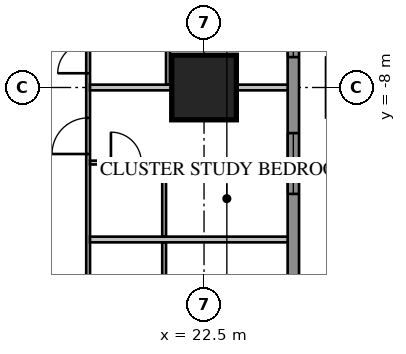
"""IFC4 building model, lengths in metres.
Left out: names, types, materials, properties, quantities, classifications, styles, units other than length and angle.
Written with IfcOpenShell. Run it as: python <this file> out.ifc"""

import sys

from ifc_helpers import new_model, si_unit, direction, frame, frame_2d, origin, origin_2d, place, context, subcontext, project, spatial, rectangle, extrude, element, fill, save


model = new_model("IFC4")
c1 = context("Model", 3, precision=1e-05, world=origin(), true_north=direction((0.0, 1.0)))
c2 = subcontext(c1, "Body", "Model", "MODEL_VIEW")
j1 = project(units=[si_unit("LENGTHUNIT", "METRE"), si_unit("PLANEANGLEUNIT", "RADIAN")], contexts=[c1])
p1 = place(None, origin())
s1 = spatial("IfcSite", under=j1, at=p1, CompositionType="ELEMENT")
p2 = place(p1, origin())
s2 = spatial("IfcBuilding", under=s1, at=p2, CompositionType="ELEMENT")
p3 = place(p2, frame((0.0, 0.0, 35.25)))
s3 = spatial("IfcBuildingStorey", under=s2, at=p3, CompositionType="ELEMENT", Elevation=35.25)
p4 = place(p3, frame((22.5, -8.0, 0.0), z_axis=(0.0, 0.0, 1.0), x_axis=(1.0, 0.0, 0.0)))
e1 = element("IfcColumn", 1, at=p4, inside=s3, PredefinedType="COLUMN", context=c2, shape_type="SweptSolid", body=[
    extrude(rectangle(XDim=1.7, YDim=1.7, at=origin_2d()), origin(), (0.0, 0.0, 1.0), 3.85),
])
p5 = place(p3, frame((24.85, -16.0, 0.0), z_axis=(0.0, 0.0, 1.0), x_axis=(0.0, 1.0, 0.0)))
e2 = element("IfcWall", 2, at=p5, inside=s3, PredefinedType="SOLIDWALL", context=c2, shape_type="SweptSolid", body=[
    extrude(rectangle(XDim=32.0, YDim=0.3, at=frame_2d((16.0, 0.0))), origin(), (0.0, 0.0, 1.0), 3.65),
])
p6 = place(p5, frame((1.2, 0.0, 0.75)))
e3 = element("IfcOpeningElement", 3, at=p6, cuts=e2, PredefinedType="OPENING", context=c2, shape_type="SweptSolid", body=[
    extrude(rectangle(XDim=1.6, YDim=1.8, at=frame_2d((0.8, 0.9))), frame((0.0, 0.17, 0.0), z_axis=(0.0, -1.0, 0.0), x_axis=(1.0, 0.0, 0.0)), (0.0, 0.0, 1.0), 0.34),
])
p7 = place(p5, frame((5.2, 0.0, 0.75)))
e4 = element("IfcOpeningElement", 4, at=p7, cuts=e2, PredefinedType="OPENING", context=c2, shape_type="SweptSolid", body=[
    extrude(rectangle(XDim=1.6, YDim=1.8, at=frame_2d((0.8, 0.9))), frame((0.0, 0.17, 0.0), z_axis=(0.0, -1.0, 0.0), x_axis=(1.0, 0.0, 0.0)), (0.0, 0.0, 1.0), 0.34),
])
p8 = place(p5, frame((17.2, 0.0, 0.75)))
e5 = element("IfcOpeningElement", 5, at=p8, cuts=e2, PredefinedType="OPENING", context=c2, shape_type="SweptSolid", body=[
    extrude(rectangle(XDim=1.6, YDim=1.8, at=frame_2d((0.8, 0.9))), frame((0.0, 0.17, 0.0), z_axis=(0.0, -1.0, 0.0), x_axis=(1.0, 0.0, 0.0)), (0.0, 0.0, 1.0), 0.34),
])
p9 = place(p5, frame((21.2, 0.0, 0.75)))
e6 = element("IfcOpeningElement", 6, at=p9, cuts=e2, PredefinedType="OPENING", context=c2, shape_type="SweptSolid", body=[
    extrude(rectangle(XDim=1.6, YDim=1.8, at=frame_2d((0.8, 0.9))), frame((0.0, 0.17, 0.0), z_axis=(0.0, -1.0, 0.0), x_axis=(1.0, 0.0, 0.0)), (0.0, 0.0, 1.0), 0.34),
])
p10 = place(p5, frame((25.2, 0.0, 0.75)))
e7 = element("IfcOpeningElement", 7, at=p10, cuts=e2, PredefinedType="OPENING", context=c2, shape_type="SweptSolid", body=[
    extrude(rectangle(XDim=1.6, YDim=1.8, at=frame_2d((0.8, 0.9))), frame((0.0, 0.17, 0.0), z_axis=(0.0, -1.0, 0.0), x_axis=(1.0, 0.0, 0.0)), (0.0, 0.0, 1.0), 0.34),
])
p11 = place(p5, frame((29.2, 0.0, 0.75)))
e8 = element("IfcOpeningElement", 8, at=p11, cuts=e2, PredefinedType="OPENING", context=c2, shape_type="SweptSolid", body=[
    extrude(rectangle(XDim=1.6, YDim=1.8, at=frame_2d((0.8, 0.9))), frame((0.0, 0.17, 0.0), z_axis=(0.0, -1.0, 0.0), x_axis=(1.0, 0.0, 0.0)), (0.0, 0.0, 1.0), 0.34),
])
p12 = place(p5, frame((8.8, 0.0, 0.75)))
e9 = element("IfcOpeningElement", 9, at=p12, cuts=e2, PredefinedType="OPENING", context=c2, shape_type="SweptSolid", body=[
    extrude(rectangle(XDim=2.4, YDim=1.8, at=frame_2d((1.2, 0.9))), frame((0.0, 0.17, 0.0), z_axis=(0.0, -1.0, 0.0), x_axis=(1.0, 0.0, 0.0)), (0.0, 0.0, 1.0), 0.34),
])
p13 = place(p5, frame((13.812, 0.0, 0.0)))
e10 = element("IfcOpeningElement", 10, at=p13, cuts=e2, PredefinedType="OPENING", context=c2, shape_type="SweptSolid", body=[
    extrude(rectangle(XDim=1.0, YDim=2.4, at=frame_2d((0.5, 1.2))), frame((0.0, 0.17, 0.0), z_axis=(0.0, -1.0, 0.0), x_axis=(1.0, 0.0, 0.0)), (0.0, 0.0, 1.0), 0.34),
])
p14 = place(p3, frame((19.45, -15.925, 0.0), z_axis=(0.0, 0.0, 1.0), x_axis=(0.0, 1.0, 0.0)))
e11 = element("IfcWall", 11, at=p14, inside=s3, PredefinedType="PARTITIONING", context=c2, shape_type="SweptSolid", body=[
    extrude(rectangle(XDim=31.85, YDim=0.1, at=frame_2d((15.925, 0.0))), origin(), (0.0, 0.0, 1.0), 3.65),
])
p15 = place(p14, frame((10.125, 0.0, 0.0)))
e12 = element("IfcOpeningElement", 12, at=p15, cuts=e11, PredefinedType="OPENING", context=c2, shape_type="SweptSolid", body=[
    extrude(rectangle(XDim=1.0, YDim=2.1, at=frame_2d((0.5, 1.05))), frame((0.0, 0.07, 0.0), z_axis=(0.0, -1.0, 0.0), x_axis=(1.0, 0.0, 0.0)), (0.0, 0.0, 1.0), 0.14),
])
p16 = place(p14, frame((8.3, 0.0, 0.0)))
e13 = element("IfcOpeningElement", 13, at=p16, cuts=e11, PredefinedType="OPENING", context=c2, shape_type="SweptSolid", body=[
    extrude(rectangle(XDim=0.8, YDim=2.1, at=frame_2d((0.4, 1.05))), frame((0.0, 0.07, 0.0), z_axis=(0.0, -1.0, 0.0), x_axis=(1.0, 0.0, 0.0)), (0.0, 0.0, 1.0), 0.14),
])
p17 = place(p14, frame((0.3, 0.0, 0.0)))
e14 = element("IfcOpeningElement", 14, at=p17, cuts=e11, PredefinedType="OPENING", context=c2, shape_type="SweptSolid", body=[
    extrude(rectangle(XDim=0.95, YDim=2.1, at=frame_2d((0.475, 1.05))), frame((0.0, 0.07, 0.0), z_axis=(0.0, -1.0, 0.0), x_axis=(1.0, 0.0, 0.0)), (0.0, 0.0, 1.0), 0.14),
])
p18 = place(p14, frame((6.175, 0.0, 0.0)))
e15 = element("IfcOpeningElement", 15, at=p18, cuts=e11, PredefinedType="OPENING", context=c2, shape_type="SweptSolid", body=[
    extrude(rectangle(XDim=0.95, YDim=2.1, at=frame_2d((0.475, 1.05))), frame((0.0, 0.07, 0.0), z_axis=(0.0, -1.0, 0.0), x_axis=(1.0, 0.0, 0.0)), (0.0, 0.0, 1.0), 0.14),
])
p19 = place(p14, frame((16.3, 0.0, 0.0)))
e16 = element("IfcOpeningElement", 16, at=p19, cuts=e11, PredefinedType="OPENING", context=c2, shape_type="SweptSolid", body=[
    extrude(rectangle(XDim=0.95, YDim=2.1, at=frame_2d((0.475, 1.05))), frame((0.0, 0.07, 0.0), z_axis=(0.0, -1.0, 0.0), x_axis=(1.0, 0.0, 0.0)), (0.0, 0.0, 1.0), 0.14),
])
p20 = place(p14, frame((22.175, 0.0, 0.0)))
e17 = element("IfcOpeningElement", 17, at=p20, cuts=e11, PredefinedType="OPENING", context=c2, shape_type="SweptSolid", body=[
    extrude(rectangle(XDim=0.95, YDim=2.1, at=frame_2d((0.475, 1.05))), frame((0.0, 0.07, 0.0), z_axis=(0.0, -1.0, 0.0), x_axis=(1.0, 0.0, 0.0)), (0.0, 0.0, 1.0), 0.14),
])
p21 = place(p14, frame((24.3, 0.0, 0.0)))
e18 = element("IfcOpeningElement", 18, at=p21, cuts=e11, PredefinedType="OPENING", context=c2, shape_type="SweptSolid", body=[
    extrude(rectangle(XDim=0.95, YDim=2.1, at=frame_2d((0.475, 1.05))), frame((0.0, 0.07, 0.0), z_axis=(0.0, -1.0, 0.0), x_axis=(1.0, 0.0, 0.0)), (0.0, 0.0, 1.0), 0.14),
])
p22 = place(p14, frame((30.175, 0.0, 0.0)))
e19 = element("IfcOpeningElement", 19, at=p22, cuts=e11, PredefinedType="OPENING", context=c2, shape_type="SweptSolid", body=[
    extrude(rectangle(XDim=0.95, YDim=2.1, at=frame_2d((0.475, 1.05))), frame((0.0, 0.07, 0.0), z_axis=(0.0, -1.0, 0.0), x_axis=(1.0, 0.0, 0.0)), (0.0, 0.0, 1.0), 0.14),
])
p23 = place(p3, frame((21.55, -7.925, 0.0), z_axis=(0.0, 0.0, 1.0), x_axis=(0.0, 1.0, 0.0)))
e20 = element("IfcWall", 20, at=p23, inside=s3, PredefinedType="PARTITIONING", context=c2, shape_type="SweptSolid", body=[
    extrude(rectangle(XDim=1.7, YDim=0.1, at=frame_2d((0.85, 0.0))), origin(), (0.0, 0.0, 1.0), 3.65),
])
for number, where, z_axis, x_axis in (
    (21, (19.5, -12.0, 0.0), (0.0, 0.0, 1.0), (1.0, 0.0, 0.0)),
    (22, (19.5, -8.0, 0.0), (0.0, 0.0, 1.0), (1.0, 0.0, 0.0)),
):
    element("IfcWall", number, at=place(p3, frame(where, z_axis=z_axis, x_axis=x_axis)), inside=s3, PredefinedType="PARTITIONING", context=c2, shape_type="SweptSolid", body=[
        extrude(rectangle(XDim=5.2, YDim=0.15, at=frame_2d((2.6, 0.0))), origin(), (0.0, 0.0, 1.0), 3.65),
    ])
p24 = place(p3, frame((21.45, -13.975, 0.0), z_axis=(0.0, 0.0, 1.0), x_axis=(0.0, 1.0, 0.0)))
e23 = element("IfcWall", 23, at=p24, inside=s3, PredefinedType="PARTITIONING", context=c2, shape_type="SweptSolid", body=[
    extrude(rectangle(XDim=1.9, YDim=0.1, at=frame_2d((0.95, 0.0))), origin(), (0.0, 0.0, 1.0), 3.65),
])
p25 = place(p3, frame((19.5, -9.975, 0.0), z_axis=(0.0, 0.0, 1.0), x_axis=(1.0, 0.0, 0.0)))
e24 = element("IfcWall", 24, at=p25, inside=s3, PredefinedType="PARTITIONING", context=c2, shape_type="SweptSolid", body=[
    extrude(rectangle(XDim=2.0, YDim=0.1, at=frame_2d((1.0, 0.0))), origin(), (0.0, 0.0, 1.0), 3.65),
])
p26 = place(p25, frame((0.55, 0.0, 0.0)))
e25 = element("IfcOpeningElement", 25, at=p26, cuts=e24, PredefinedType="OPENING", context=c2, shape_type="SweptSolid", body=[
    extrude(rectangle(XDim=0.8, YDim=2.1, at=frame_2d((0.4, 1.05))), frame((0.0, 0.07, 0.0), z_axis=(0.0, -1.0, 0.0), x_axis=(1.0, 0.0, 0.0)), (0.0, 0.0, 1.0), 0.14),
])
p27 = place(p3, frame((21.45, -11.925, 0.0), z_axis=(0.0, 0.0, 1.0), x_axis=(0.0, 1.0, 0.0)))
e26 = element("IfcWall", 26, at=p27, inside=s3, PredefinedType="PARTITIONING", context=c2, shape_type="SweptSolid", body=[
    extrude(rectangle(XDim=1.9, YDim=0.1, at=frame_2d((0.95, 0.0))), origin(), (0.0, 0.0, 1.0), 3.65),
])
p28 = place(p7, origin())
e27 = element("IfcWindow", 27, at=p28, inside=s3, PartitioningType="SINGLE_PANEL", PredefinedType="WINDOW", context=c2, shape_type="SweptSolid", body=[
    extrude(rectangle(XDim=1.6, YDim=1.8, at=frame_2d((0.8, 0.9))), frame((0.0, 0.03, 0.0), z_axis=(0.0, -1.0, 0.0), x_axis=(1.0, 0.0, 0.0)), (0.0, 0.0, 1.0), 0.06),
])
fill(e4, e27)
p29 = place(p12, origin())
e28 = element("IfcWindow", 28, at=p29, inside=s3, PartitioningType="SINGLE_PANEL", PredefinedType="WINDOW", context=c2, shape_type="SweptSolid", body=[
    extrude(rectangle(XDim=2.4, YDim=1.8, at=frame_2d((1.2, 0.9))), frame((0.0, 0.03, 0.0), z_axis=(0.0, -1.0, 0.0), x_axis=(1.0, 0.0, 0.0)), (0.0, 0.0, 1.0), 0.06),
])
fill(e9, e28)
p30 = place(p16, origin())
e29 = element("IfcDoor", 29, at=p30, inside=s3, OperationType="SINGLE_SWING_LEFT", PredefinedType="DOOR", context=c2, shape_type="SweptSolid", body=[
    extrude(rectangle(XDim=0.8, YDim=2.1, at=frame_2d((0.4, 1.05))), frame((0.0, 0.025, 0.0), z_axis=(0.0, -1.0, 0.0), x_axis=(1.0, 0.0, 0.0)), (0.0, 0.0, 1.0), 0.05),
])
fill(e13, e29)
p31 = place(p18, origin())
e30 = element("IfcDoor", 30, at=p31, inside=s3, OperationType="SINGLE_SWING_LEFT", PredefinedType="DOOR", context=c2, shape_type="SweptSolid", body=[
    extrude(rectangle(XDim=0.95, YDim=2.1, at=frame_2d((0.475, 1.05))), frame((0.0, 0.025, 0.0), z_axis=(0.0, -1.0, 0.0), x_axis=(1.0, 0.0, 0.0)), (0.0, 0.0, 1.0), 0.05),
])
fill(e15, e30)
p32 = place(p26, origin())
e31 = element("IfcDoor", 31, at=p32, inside=s3, OperationType="SINGLE_SWING_LEFT", PredefinedType="DOOR", context=c2, shape_type="SweptSolid", body=[
    extrude(rectangle(XDim=0.8, YDim=2.1, at=frame_2d((0.4, 1.05))), frame((0.0, 0.025, 0.0), z_axis=(0.0, -1.0, 0.0), x_axis=(1.0, 0.0, 0.0)), (0.0, 0.0, 1.0), 0.05),
])
fill(e25, e31)
save(model, sys.argv[1])
